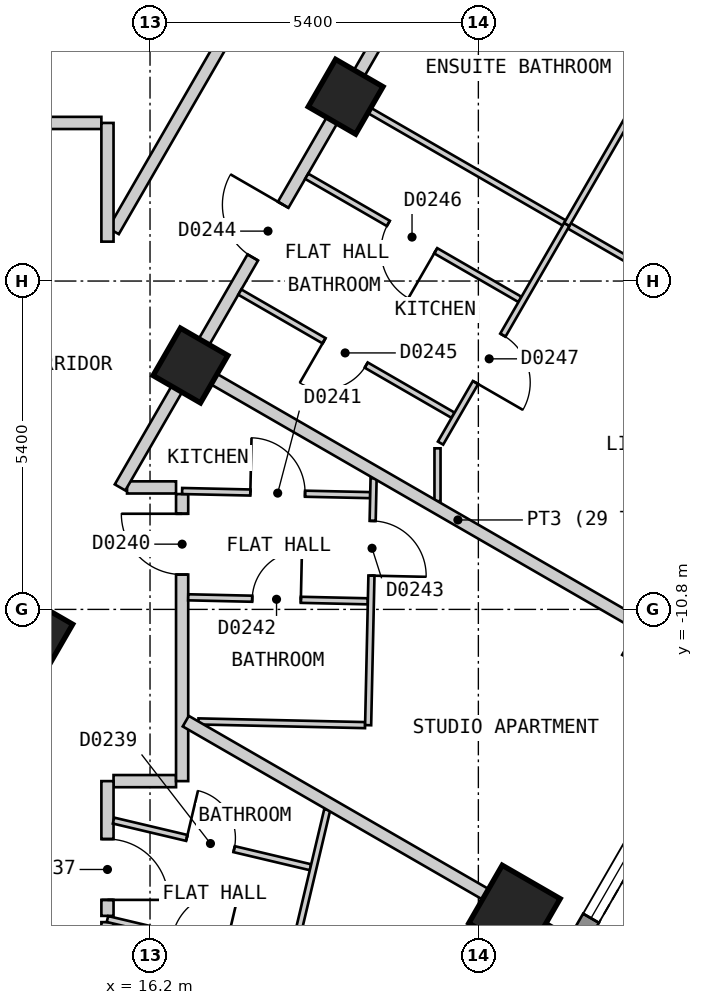
"""IFC4 building model, lengths in metres.
Left out: names, types, materials, properties, quantities, classifications, styles, units other than length and angle.
Written with IfcOpenShell. Run it as: python <this file> out.ifc"""

import sys

from ifc_helpers import new_model, si_unit, direction, frame, frame_2d, origin, origin_2d, place, context, subcontext, project, spatial, polyline, rectangle, outline, extrude, element, fill, save


model = new_model("IFC4")
c1 = context("Model", 3, precision=1e-05, world=origin(), true_north=direction((0.0, 1.0)))
c2 = subcontext(c1, "Body", "Model", "MODEL_VIEW")
j1 = project(units=[si_unit("LENGTHUNIT", "METRE"), si_unit("PLANEANGLEUNIT", "RADIAN")], contexts=[c1])
p1 = place(None, origin())
s1 = spatial("IfcSite", under=j1, at=p1, CompositionType="ELEMENT")
p2 = place(p1, origin())
s2 = spatial("IfcBuilding", under=s1, at=p2, CompositionType="ELEMENT")
p3 = place(p2, frame((0.0, 0.0, 41.4)))
s3 = spatial("IfcBuildingStorey", under=s2, at=p3, CompositionType="ELEMENT", Elevation=41.4)
p4 = place(p3, frame((22.194, -15.759, 0.0), z_axis=(0.0, 0.0, 1.0), x_axis=(0.499984884929, 0.866034130299, 0.0)))
e1 = element("IfcColumn", 1, at=p4, inside=s3, PredefinedType="COLUMN", context=c2, shape_type="SweptSolid", body=[
    extrude(rectangle(XDim=1.1, YDim=1.1, at=origin_2d()), origin(), (0.0, 0.0, 1.0), 3.0),
])
for number, where, z_axis, x_axis in (
    (2, (14.313, -11.209, 0.0), (0.0, 0.0, 1.0), (0.5, 0.866, 0.0)),
    (3, (16.865, -6.789, 0.0), (0.0, 0.0, 1.0), (0.5, 0.866, 0.0)),
    (4, (19.417, -2.369, 0.0), (0.0, 0.0, 1.0), (0.5, 0.866, 0.0)),
):
    element("IfcColumn", number, at=place(p3, frame(where, z_axis=z_axis, x_axis=x_axis)), inside=s3, PredefinedType="COLUMN", context=c2, shape_type="SweptSolid", body=[
        extrude(rectangle(XDim=0.9, YDim=0.9, at=origin_2d()), origin(), (0.0, 0.0, 1.0), 3.0),
    ])
p5 = place(p3, frame((17.71, -25.825, 0.0), z_axis=(0.0, 0.0, 1.0), x_axis=(0.500001938803, 0.866024284413, 0.0)))
e5 = element("IfcWall", 5, at=p5, inside=s3, PredefinedType="SOLIDWALL", context=c2, shape_type="SweptSolid", body=[
    extrude(outline(polyline([(0.0, -0.15), (27.02, -0.15), (26.94, 0.15), (0.08, 0.15), (0.0, -0.15)])), origin(), (0.0, 0.0, 1.0), 2.7),
])
p6 = place(p5, frame((1.277, 0.0, 0.15)))
e6 = element("IfcOpeningElement", 6, at=p6, cuts=e5, PredefinedType="OPENING", context=c2, shape_type="SweptSolid", body=[
    extrude(rectangle(XDim=1.5, YDim=2.1, at=frame_2d((0.75, 1.05))), frame((0.0, 0.16, 0.0), z_axis=(0.0, -1.0, 0.0), x_axis=(1.0, 0.0, 0.0)), (0.0, 0.0, 1.0), 0.32),
])
p7 = place(p5, frame((3.829, 0.0, 0.15)))
e7 = element("IfcOpeningElement", 7, at=p7, cuts=e5, PredefinedType="OPENING", context=c2, shape_type="SweptSolid", body=[
    extrude(rectangle(XDim=1.5, YDim=2.1, at=frame_2d((0.75, 1.05))), frame((0.0, 0.16, 0.0), z_axis=(0.0, -1.0, 0.0), x_axis=(1.0, 0.0, 0.0)), (0.0, 0.0, 1.0), 0.32),
])
p8 = place(p5, frame((6.382, 0.0, 0.15)))
e8 = element("IfcOpeningElement", 8, at=p8, cuts=e5, PredefinedType="OPENING", context=c2, shape_type="SweptSolid", body=[
    extrude(rectangle(XDim=1.5, YDim=2.1, at=frame_2d((0.75, 1.05))), frame((0.0, 0.16, 0.0), z_axis=(0.0, -1.0, 0.0), x_axis=(1.0, 0.0, 0.0)), (0.0, 0.0, 1.0), 0.32),
])
p9 = place(p5, frame((8.933, 0.0, 0.15)))
e9 = element("IfcOpeningElement", 9, at=p9, cuts=e5, PredefinedType="OPENING", context=c2, shape_type="SweptSolid", body=[
    extrude(rectangle(XDim=1.5, YDim=2.1, at=frame_2d((0.75, 1.05))), frame((0.0, 0.16, 0.0), z_axis=(0.0, -1.0, 0.0), x_axis=(1.0, 0.0, 0.0)), (0.0, 0.0, 1.0), 0.32),
])
p10 = place(p5, frame((11.485, 0.0, 0.15)))
e10 = element("IfcOpeningElement", 10, at=p10, cuts=e5, PredefinedType="OPENING", context=c2, shape_type="SweptSolid", body=[
    extrude(rectangle(XDim=1.5, YDim=2.1, at=frame_2d((0.75, 1.05))), frame((0.0, 0.16, 0.0), z_axis=(0.0, -1.0, 0.0), x_axis=(1.0, 0.0, 0.0)), (0.0, 0.0, 1.0), 0.32),
])
p11 = place(p5, frame((14.037, 0.0, 0.15)))
e11 = element("IfcOpeningElement", 11, at=p11, cuts=e5, PredefinedType="OPENING", context=c2, shape_type="SweptSolid", body=[
    extrude(rectangle(XDim=1.5, YDim=2.1, at=frame_2d((0.75, 1.05))), frame((0.0, 0.16, 0.0), z_axis=(0.0, -1.0, 0.0), x_axis=(1.0, 0.0, 0.0)), (0.0, 0.0, 1.0), 0.32),
])
p12 = place(p5, frame((16.589, 0.0, 0.15)))
e12 = element("IfcOpeningElement", 12, at=p12, cuts=e5, PredefinedType="OPENING", context=c2, shape_type="SweptSolid", body=[
    extrude(rectangle(XDim=1.5, YDim=2.1, at=frame_2d((0.75, 1.05))), frame((0.0, 0.16, 0.0), z_axis=(0.0, -1.0, 0.0), x_axis=(1.0, 0.0, 0.0)), (0.0, 0.0, 1.0), 0.32),
])
p13 = place(p5, frame((19.141, 0.0, 0.15)))
e13 = element("IfcOpeningElement", 13, at=p13, cuts=e5, PredefinedType="OPENING", context=c2, shape_type="SweptSolid", body=[
    extrude(rectangle(XDim=1.5, YDim=2.1, at=frame_2d((0.75, 1.05))), frame((0.0, 0.16, 0.0), z_axis=(0.0, -1.0, 0.0), x_axis=(1.0, 0.0, 0.0)), (0.0, 0.0, 1.0), 0.32),
])
p14 = place(p5, frame((21.693, 0.0, 0.15)))
e14 = element("IfcOpeningElement", 14, at=p14, cuts=e5, PredefinedType="OPENING", context=c2, shape_type="SweptSolid", body=[
    extrude(rectangle(XDim=1.5, YDim=2.1, at=frame_2d((0.75, 1.05))), frame((0.0, 0.16, 0.0), z_axis=(0.0, -1.0, 0.0), x_axis=(1.0, 0.0, 0.0)), (0.0, 0.0, 1.0), 0.32),
])
p15 = place(p5, frame((24.244, 0.0, 0.15)))
e15 = element("IfcOpeningElement", 15, at=p15, cuts=e5, PredefinedType="OPENING", context=c2, shape_type="SweptSolid", body=[
    extrude(rectangle(XDim=1.5, YDim=2.1, at=frame_2d((0.75, 1.05))), frame((0.0, 0.16, 0.0), z_axis=(0.0, -1.0, 0.0), x_axis=(1.0, 0.0, 0.0)), (0.0, 0.0, 1.0), 0.32),
])
p16 = place(p3, frame((15.5, -15.943, 0.0), z_axis=(0.0, 0.0, 1.0), x_axis=(0.0, -1.0, 0.0)))
e16 = element("IfcWall", 16, at=p16, inside=s3, PredefinedType="PARTITIONING", context=c2, shape_type="SweptSolid", body=[
    extrude(rectangle(XDim=1.729, YDim=0.2, at=frame_2d((0.865, 0.0))), origin(), (0.0, 0.0, 1.0), 2.7),
])
p17 = place(p3, frame((15.822, -8.794, 0.0), z_axis=(0.0, 0.0, 1.0), x_axis=(1.0, 0.0, 0.0)))
e17 = element("IfcWall", 17, at=p17, inside=s3, PredefinedType="PARTITIONING", context=c2, shape_type="SweptSolid", body=[
    extrude(rectangle(XDim=0.806, YDim=0.2, at=frame_2d((0.403, 0.0))), origin(), (0.0, 0.0, 1.0), 2.7),
])
p18 = place(p3, frame((15.6, -13.624, 0.0), z_axis=(0.0, 0.0, 1.0), x_axis=(1.0, 0.0, 0.0)))
e18 = element("IfcWall", 18, at=p18, inside=s3, PredefinedType="PARTITIONING", context=c2, shape_type="SweptSolid", body=[
    extrude(rectangle(XDim=1.028, YDim=0.2, at=frame_2d((0.514, 0.0))), origin(), (0.0, 0.0, 1.0), 2.7),
])
p19 = place(p3, frame((7.028, -2.8, 0.0), z_axis=(0.0, 0.0, 1.0), x_axis=(1.0, 0.0, 0.0)))
e19 = element("IfcWall", 19, at=p19, inside=s3, PredefinedType="PARTITIONING", context=c2, shape_type="SweptSolid", body=[
    extrude(rectangle(XDim=8.372, YDim=0.2, at=frame_2d((4.186, 0.0))), origin(), (0.0, 0.0, 1.0), 2.7),
])
p20 = place(p3, frame((15.6, -4.579, 0.0), z_axis=(0.0, 0.0, 1.0), x_axis=(0.499927597274, 0.866067201483, 0.0)))
e20 = element("IfcWall", 20, at=p20, inside=s3, PredefinedType="PARTITIONING", context=c2, shape_type="SweptSolid", body=[
    extrude(rectangle(XDim=5.288, YDim=0.2, at=frame_2d((2.644, 0.0))), origin(), (0.0, 0.0, 1.0), 2.7),
])
p21 = place(p3, frame((15.707, -8.794, 0.0), z_axis=(0.0, 0.0, 1.0), x_axis=(0.500040469623, 0.866002037376, 0.0)))
e21 = element("IfcWall", 21, at=p21, inside=s3, PredefinedType="PARTITIONING", context=c2, shape_type="SweptSolid", body=[
    extrude(rectangle(XDim=2.281, YDim=0.2, at=frame_2d((1.141, 0.0))), origin(), (0.0, 0.0, 1.0), 2.7),
])
p22 = place(p3, frame((16.864, -6.789, 0.0), z_axis=(0.0, 0.0, 1.0), x_axis=(0.500058020612, 0.865991902977, 0.0)))
e22 = element("IfcWall", 22, at=p22, inside=s3, PredefinedType="PARTITIONING", context=c2, shape_type="SweptSolid", body=[
    extrude(rectangle(XDim=7.725, YDim=0.2, at=frame_2d((3.863, 0.0))), origin(), (0.0, 0.0, 1.0), 2.7),
])
p23 = place(p22, frame((2.052, 0.0, 0.0)))
e23 = element("IfcOpeningElement", 23, at=p23, cuts=e22, PredefinedType="OPENING", context=c2, shape_type="SweptSolid", body=[
    extrude(rectangle(XDim=1.0, YDim=2.1, at=frame_2d((0.5, 1.05))), frame((0.0, 0.11, 0.0), z_axis=(0.0, -1.0, 0.0), x_axis=(1.0, 0.0, 0.0)), (0.0, 0.0, 1.0), 0.22),
])
p24 = place(p3, frame((15.5, -15.84, 0.0), z_axis=(0.0, 0.0, 1.0), x_axis=(0.0, 1.0, 0.0)))
e24 = element("IfcWall", 24, at=p24, inside=s3, PredefinedType="PARTITIONING", context=c2, shape_type="SweptSolid", body=[
    extrude(rectangle(XDim=2.216, YDim=0.2, at=frame_2d((1.108, 0.0))), origin(), (0.0, 0.0, 1.0), 2.7),
])
p25 = place(p24, frame((0.263, 0.0, 0.0)))
e25 = element("IfcOpeningElement", 25, at=p25, cuts=e24, PredefinedType="OPENING", context=c2, shape_type="SweptSolid", body=[
    extrude(rectangle(XDim=1.0, YDim=2.1, at=frame_2d((0.5, 1.05))), frame((0.0, 0.11, 0.0), z_axis=(0.0, -1.0, 0.0), x_axis=(1.0, 0.0, 0.0)), (0.0, 0.0, 1.0), 0.22),
])
p26 = place(p3, frame((15.5, -4.752, 0.0), z_axis=(0.0, 0.0, 1.0), x_axis=(0.0, 1.0, 0.0)))
e26 = element("IfcWall", 26, at=p26, inside=s3, PredefinedType="PARTITIONING", context=c2, shape_type="SweptSolid", body=[
    extrude(rectangle(XDim=1.952, YDim=0.2, at=frame_2d((0.976, 0.0))), origin(), (0.0, 0.0, 1.0), 2.7),
])
p27 = place(p3, frame((16.728, -13.624, 0.0), z_axis=(0.0, 0.0, 1.0), x_axis=(0.0, 1.0, 0.0)))
e27 = element("IfcWall", 27, at=p27, inside=s3, PredefinedType="PARTITIONING", context=c2, shape_type="SweptSolid", body=[
    extrude(rectangle(XDim=4.721, YDim=0.2, at=frame_2d((2.36, 0.0))), origin(), (0.0, 0.0, 1.0), 2.7),
])
p28 = place(p27, frame((3.397, 0.0, 0.0)))
e28 = element("IfcOpeningElement", 28, at=p28, cuts=e27, PredefinedType="OPENING", context=c2, shape_type="SweptSolid", body=[
    extrude(rectangle(XDim=1.0, YDim=2.1, at=frame_2d((0.5, 1.05))), frame((0.0, 0.11, 0.0), z_axis=(0.0, -1.0, 0.0), x_axis=(1.0, 0.0, 0.0)), (0.0, 0.0, 1.0), 0.22),
])
p29 = place(p3, frame((15.6, -14.273, 0.0), z_axis=(0.0, 0.0, 1.0), x_axis=(0.973083317443, -0.230453590368, 0.0)))
e29 = element("IfcWall", 29, at=p29, inside=s3, PredefinedType="PARTITIONING", context=c2, shape_type="SweptSolid", body=[
    extrude(rectangle(XDim=3.329, YDim=0.1, at=frame_2d((1.664, 0.0))), origin(), (0.0, 0.0, 1.0), 2.7),
])
p30 = place(p29, frame((1.238, 0.0, 0.0)))
e30 = element("IfcOpeningElement", 30, at=p30, cuts=e29, PredefinedType="OPENING", context=c2, shape_type="SweptSolid", body=[
    extrude(rectangle(XDim=0.8, YDim=2.1, at=frame_2d((0.4, 1.05))), frame((0.0, 0.06, 0.0), z_axis=(0.0, -1.0, 0.0), x_axis=(1.0, 0.0, 0.0)), (0.0, 0.0, 1.0), 0.12),
])
p31 = place(p3, frame((15.5, -15.892, 0.0), z_axis=(0.0, 0.0, 1.0), x_axis=(0.973119457068, -0.230300938504, 0.0)))
e31 = element("IfcWall", 31, at=p31, inside=s3, PredefinedType="PARTITIONING", context=c2, shape_type="SweptSolid", body=[
    extrude(rectangle(XDim=3.052, YDim=0.1, at=frame_2d((1.526, 0.0))), origin(), (0.0, 0.0, 1.0), 2.7),
])
p32 = place(p31, frame((1.102, 0.0, 0.0)))
e32 = element("IfcOpeningElement", 32, at=p32, cuts=e31, PredefinedType="OPENING", context=c2, shape_type="SweptSolid", body=[
    extrude(rectangle(XDim=0.9, YDim=2.1, at=frame_2d((0.45, 1.05))), frame((0.0, 0.06, 0.0), z_axis=(0.0, -1.0, 0.0), x_axis=(1.0, 0.0, 0.0)), (0.0, 0.0, 1.0), 0.12),
])
p33 = place(p3, frame((16.728, -8.853, 0.0), z_axis=(0.0, 0.0, 1.0), x_axis=(0.999759332126, -0.021938045176, 0.0)))
e33 = element("IfcWall", 33, at=p33, inside=s3, PredefinedType="PARTITIONING", context=c2, shape_type="SweptSolid", body=[
    extrude(rectangle(XDim=3.094, YDim=0.1, at=frame_2d((1.547, 0.0))), origin(), (0.0, 0.0, 1.0), 2.7),
])
p34 = place(p33, frame((1.122, 0.0, 0.0)))
e34 = element("IfcOpeningElement", 34, at=p34, cuts=e33, PredefinedType="OPENING", context=c2, shape_type="SweptSolid", body=[
    extrude(rectangle(XDim=0.9, YDim=2.1, at=frame_2d((0.45, 1.05))), frame((0.0, 0.06, 0.0), z_axis=(0.0, -1.0, 0.0), x_axis=(1.0, 0.0, 0.0)), (0.0, 0.0, 1.0), 0.12),
])
p35 = place(p3, frame((16.828, -10.601, 0.0), z_axis=(0.0, 0.0, 1.0), x_axis=(0.999751134527, -0.02230849639, 0.0)))
e35 = element("IfcWall", 35, at=p35, inside=s3, PredefinedType="PARTITIONING", context=c2, shape_type="SweptSolid", body=[
    extrude(rectangle(XDim=2.955, YDim=0.1, at=frame_2d((1.478, 0.0))), origin(), (0.0, 0.0, 1.0), 2.7),
])
p36 = place(p35, frame((1.053, 0.0, 0.0)))
e36 = element("IfcOpeningElement", 36, at=p36, cuts=e35, PredefinedType="OPENING", context=c2, shape_type="SweptSolid", body=[
    extrude(rectangle(XDim=0.8, YDim=2.1, at=frame_2d((0.4, 1.05))), frame((0.0, 0.06, 0.0), z_axis=(0.0, -1.0, 0.0), x_axis=(1.0, 0.0, 0.0)), (0.0, 0.0, 1.0), 0.12),
])
p37 = place(p3, frame((16.996, -12.642, 0.0), z_axis=(0.0, 0.0, 1.0), x_axis=(0.999754143854, -0.022173223641, 0.0)))
e37 = element("IfcWall", 37, at=p37, inside=s3, PredefinedType="PARTITIONING", context=c2, shape_type="SweptSolid", body=[
    extrude(rectangle(XDim=2.742, YDim=0.1, at=frame_2d((1.371, 0.0))), origin(), (0.0, 0.0, 1.0), 2.7),
])
p38 = place(p3, frame((17.677, -5.582, 0.0), z_axis=(0.0, 0.0, 1.0), x_axis=(0.866015917575, -0.500016430238, 0.0)))
e38 = element("IfcWall", 38, at=p38, inside=s3, PredefinedType="PARTITIONING", context=c2, shape_type="SweptSolid", body=[
    extrude(rectangle(XDim=4.05, YDim=0.1, at=frame_2d((2.025, 0.0))), origin(), (0.0, 0.0, 1.0), 2.7),
])
p39 = place(p38, frame((1.6, 0.0, 0.0)))
e39 = element("IfcOpeningElement", 39, at=p39, cuts=e38, PredefinedType="OPENING", context=c2, shape_type="SweptSolid", body=[
    extrude(rectangle(XDim=0.8, YDim=2.1, at=frame_2d((0.4, 1.05))), frame((0.0, 0.06, 0.0), z_axis=(0.0, -1.0, 0.0), x_axis=(1.0, 0.0, 0.0)), (0.0, 0.0, 1.0), 0.12),
])
p40 = place(p3, frame((18.777, -3.677, 0.0), z_axis=(0.0, 0.0, 1.0), x_axis=(0.866000843773, -0.500042536776, 0.0)))
e40 = element("IfcWall", 40, at=p40, inside=s3, PredefinedType="PARTITIONING", context=c2, shape_type="SweptSolid", body=[
    extrude(rectangle(XDim=4.05, YDim=0.1, at=frame_2d((2.025, 0.0))), origin(), (0.0, 0.0, 1.0), 2.7),
])
p41 = place(p40, frame((1.55, 0.0, 0.0)))
e41 = element("IfcOpeningElement", 41, at=p41, cuts=e40, PredefinedType="OPENING", context=c2, shape_type="SweptSolid", body=[
    extrude(rectangle(XDim=0.9, YDim=2.1, at=frame_2d((0.45, 1.05))), frame((0.0, 0.06, 0.0), z_axis=(0.0, -1.0, 0.0), x_axis=(1.0, 0.0, 0.0)), (0.0, 0.0, 1.0), 0.12),
])
p42 = place(p3, frame((19.503, -2.419, 0.0), z_axis=(0.0, 0.0, 1.0), x_axis=(0.866047370643, -0.499961950354, 0.0)))
e42 = element("IfcWall", 42, at=p42, inside=s3, PredefinedType="PARTITIONING", context=c2, shape_type="SweptSolid", body=[
    extrude(rectangle(XDim=10.001, YDim=0.1, at=frame_2d((5.0, 0.0))), origin(), (0.0, 0.0, 1.0), 2.7),
])
p43 = place(p42, frame((6.6, 0.0, 0.0)))
e43 = element("IfcOpeningElement", 43, at=p43, cuts=e42, PredefinedType="OPENING", context=c2, shape_type="SweptSolid", body=[
    extrude(rectangle(XDim=0.9, YDim=2.1, at=frame_2d((0.45, 1.05))), frame((0.0, 0.06, 0.0), z_axis=(0.0, -1.0, 0.0), x_axis=(1.0, 0.0, 0.0)), (0.0, 0.0, 1.0), 0.12),
])
p44 = place(p3, frame((20.978, -8.065, 0.0), z_axis=(0.0, 0.0, 1.0), x_axis=(0.499965068118, 0.866045570776, 0.0)))
e44 = element("IfcWall", 44, at=p44, inside=s3, PredefinedType="PARTITIONING", context=c2, shape_type="SweptSolid", body=[
    extrude(rectangle(XDim=4.152, YDim=0.1, at=frame_2d((2.076, 0.0))), origin(), (0.0, 0.0, 1.0), 2.7),
])
p45 = place(p44, frame((1.15, 0.0, 0.0)))
e45 = element("IfcOpeningElement", 45, at=p45, cuts=e44, PredefinedType="OPENING", context=c2, shape_type="SweptSolid", body=[
    extrude(rectangle(XDim=0.9, YDim=2.1, at=frame_2d((0.45, 1.05))), frame((0.0, 0.06, 0.0), z_axis=(0.0, -1.0, 0.0), x_axis=(1.0, 0.0, 0.0)), (0.0, 0.0, 1.0), 0.12),
])
p46 = place(p3, frame((18.52, -16.606, 0.0), z_axis=(0.0, 0.0, 1.0), x_axis=(0.230289488548, 0.973122166773, 0.0)))
e46 = element("IfcWall", 46, at=p46, inside=s3, PredefinedType="PARTITIONING", context=c2, shape_type="SweptSolid", body=[
    extrude(rectangle(XDim=2.579, YDim=0.1, at=frame_2d((1.29, 0.0))), origin(), (0.0, 0.0, 1.0), 2.7),
])
p47 = place(p3, frame((19.787, -12.704, 0.0), z_axis=(0.0, 0.0, 1.0), x_axis=(0.02212326712, 0.999755250575, 0.0)))
e47 = element("IfcWall", 47, at=p47, inside=s3, PredefinedType="PARTITIONING", context=c2, shape_type="SweptSolid", body=[
    extrude(rectangle(XDim=4.061, YDim=0.1, at=frame_2d((2.031, 0.0))), origin(), (0.0, 0.0, 1.0), 2.7),
])
p48 = place(p47, frame((2.46, 0.0, 0.0)))
e48 = element("IfcOpeningElement", 48, at=p48, cuts=e47, PredefinedType="OPENING", context=c2, shape_type="SweptSolid", body=[
    extrude(rectangle(XDim=0.9, YDim=2.1, at=frame_2d((0.45, 1.05))), frame((0.0, 0.06, 0.0), z_axis=(0.0, -1.0, 0.0), x_axis=(1.0, 0.0, 0.0)), (0.0, 0.0, 1.0), 0.12),
])
p49 = place(p3, frame((20.928, -9.02, 0.0), z_axis=(0.0, 0.0, 1.0), x_axis=(0.0, 1.0, 0.0)))
e49 = element("IfcWall", 49, at=p49, inside=s3, PredefinedType="PARTITIONING", context=c2, shape_type="SweptSolid", body=[
    extrude(rectangle(XDim=0.869, YDim=0.1, at=frame_2d((0.435, 0.0))), origin(), (0.0, 0.0, 1.0), 2.7),
])
p50 = place(p3, frame((16.788, -12.638, 0.0), z_axis=(0.0, 0.0, 1.0), x_axis=(0.866027278279, -0.499996753267, 0.0)))
e50 = element("IfcWall", 50, at=p50, inside=s3, PredefinedType="PARTITIONING", context=c2, shape_type="SweptSolid", body=[
    extrude(rectangle(XDim=7.242, YDim=0.2, at=frame_2d((3.621, 0.0))), origin(), (0.0, 0.0, 1.0), 2.7),
])
p51 = place(p3, frame((16.916, -6.819, 0.0), z_axis=(0.0, 0.0, 1.0), x_axis=(0.866028876723, -0.499993984646, 0.0)))
e51 = element("IfcWall", 51, at=p51, inside=s3, PredefinedType="PARTITIONING", context=c2, shape_type="SweptSolid", body=[
    extrude(rectangle(XDim=10.04, YDim=0.2, at=frame_2d((5.02, 0.0))), origin(), (0.0, 0.0, 1.0), 2.7),
])
p52 = place(p3, frame((23.054, -4.469, 0.0), z_axis=(0.0, 0.0, 1.0), x_axis=(0.500023345639, 0.866011924754, 0.0)))
e52 = element("IfcWall", 52, at=p52, inside=s3, PredefinedType="PARTITIONING", context=c2, shape_type="SweptSolid", body=[
    extrude(rectangle(XDim=5.104, YDim=0.1, at=frame_2d((2.552, 0.0))), origin(), (0.0, 0.0, 1.0), 2.7),
])
p53 = place(p52, frame((2.152, 0.0, 0.0)))
e53 = element("IfcOpeningElement", 53, at=p53, cuts=e52, PredefinedType="OPENING", context=c2, shape_type="SweptSolid", body=[
    extrude(rectangle(XDim=0.8, YDim=2.1, at=frame_2d((0.4, 1.05))), frame((0.0, 0.06, 0.0), z_axis=(0.0, -1.0, 0.0), x_axis=(1.0, 0.0, 0.0)), (0.0, 0.0, 1.0), 0.12),
])
p54 = place(p10, origin())
e54 = element("IfcWindow", 54, at=p54, inside=s3, PartitioningType="SINGLE_PANEL", PredefinedType="WINDOW", context=c2, shape_type="SweptSolid", body=[
    extrude(rectangle(XDim=1.5, YDim=2.1, at=frame_2d((0.75, 1.05))), frame((0.0, 0.03, 0.0), z_axis=(0.0, -1.0, 0.0), x_axis=(1.0, 0.0, 0.0)), (0.0, 0.0, 1.0), 0.06),
])
fill(e10, e54)
p55 = place(p25, origin())
e55 = element("IfcDoor", 55, at=p55, inside=s3, OperationType="SINGLE_SWING_LEFT", PredefinedType="DOOR", context=c2, shape_type="SweptSolid", body=[
    extrude(rectangle(XDim=1.0, YDim=2.1, at=frame_2d((0.5, 1.05))), frame((0.0, 0.025, 0.0), z_axis=(0.0, -1.0, 0.0), x_axis=(1.0, 0.0, 0.0)), (0.0, 0.0, 1.0), 0.05),
])
fill(e25, e55)
p56 = place(p30, origin())
e56 = element("IfcDoor", 56, at=p56, inside=s3, OperationType="SINGLE_SWING_LEFT", PredefinedType="DOOR", context=c2, shape_type="SweptSolid", body=[
    extrude(rectangle(XDim=0.8, YDim=2.1, at=frame_2d((0.4, 1.05))), frame((0.0, 0.025, 0.0), z_axis=(0.0, -1.0, 0.0), x_axis=(1.0, 0.0, 0.0)), (0.0, 0.0, 1.0), 0.05),
])
fill(e30, e56)
p57 = place(p28, origin())
e57 = element("IfcDoor", 57, at=p57, inside=s3, OperationType="SINGLE_SWING_RIGHT", PredefinedType="DOOR", context=c2, shape_type="SweptSolid", body=[
    extrude(rectangle(XDim=1.0, YDim=2.1, at=frame_2d((0.5, 1.05))), frame((0.0, 0.025, 0.0), z_axis=(0.0, -1.0, 0.0), x_axis=(1.0, 0.0, 0.0)), (0.0, 0.0, 1.0), 0.05),
])
fill(e28, e57)
p58 = place(p34, origin())
e58 = element("IfcDoor", 58, at=p58, inside=s3, OperationType="SINGLE_SWING_LEFT", PredefinedType="DOOR", context=c2, shape_type="SweptSolid", body=[
    extrude(rectangle(XDim=0.9, YDim=2.1, at=frame_2d((0.45, 1.05))), frame((0.0, 0.025, 0.0), z_axis=(0.0, -1.0, 0.0), x_axis=(1.0, 0.0, 0.0)), (0.0, 0.0, 1.0), 0.05),
])
fill(e34, e58)
p59 = place(p36, origin())
e59 = element("IfcDoor", 59, at=p59, inside=s3, OperationType="SINGLE_SWING_RIGHT", PredefinedType="DOOR", context=c2, shape_type="SweptSolid", body=[
    extrude(rectangle(XDim=0.8, YDim=2.1, at=frame_2d((0.4, 1.05))), frame((0.0, 0.025, 0.0), z_axis=(0.0, -1.0, 0.0), x_axis=(1.0, 0.0, 0.0)), (0.0, 0.0, 1.0), 0.05),
])
fill(e36, e59)
p60 = place(p48, origin())
e60 = element("IfcDoor", 60, at=p60, inside=s3, OperationType="SINGLE_SWING_LEFT", PredefinedType="DOOR", context=c2, shape_type="SweptSolid", body=[
    extrude(rectangle(XDim=0.9, YDim=2.1, at=frame_2d((0.45, 1.05))), frame((0.0, 0.025, 0.0), z_axis=(0.0, -1.0, 0.0), x_axis=(1.0, 0.0, 0.0)), (0.0, 0.0, 1.0), 0.05),
])
fill(e48, e60)
p61 = place(p23, origin())
e61 = element("IfcDoor", 61, at=p61, inside=s3, OperationType="SINGLE_SWING_RIGHT", PredefinedType="DOOR", context=c2, shape_type="SweptSolid", body=[
    extrude(rectangle(XDim=1.0, YDim=2.1, at=frame_2d((0.5, 1.05))), frame((0.0, 0.025, 0.0), z_axis=(0.0, -1.0, 0.0), x_axis=(1.0, 0.0, 0.0)), (0.0, 0.0, 1.0), 0.05),
])
fill(e23, e61)
p62 = place(p39, origin())
e62 = element("IfcDoor", 62, at=p62, inside=s3, OperationType="SINGLE_SWING_LEFT", PredefinedType="DOOR", context=c2, shape_type="SweptSolid", body=[
    extrude(rectangle(XDim=0.8, YDim=2.1, at=frame_2d((0.4, 1.05))), frame((0.0, 0.025, 0.0), z_axis=(0.0, -1.0, 0.0), x_axis=(1.0, 0.0, 0.0)), (0.0, 0.0, 1.0), 0.05),
])
fill(e39, e62)
p63 = place(p41, origin())
e63 = element("IfcDoor", 63, at=p63, inside=s3, OperationType="SINGLE_SWING_RIGHT", PredefinedType="DOOR", context=c2, shape_type="SweptSolid", body=[
    extrude(rectangle(XDim=0.9, YDim=2.1, at=frame_2d((0.45, 1.05))), frame((0.0, 0.025, 0.0), z_axis=(0.0, -1.0, 0.0), x_axis=(1.0, 0.0, 0.0)), (0.0, 0.0, 1.0), 0.05),
])
fill(e41, e63)
p64 = place(p45, origin())
e64 = element("IfcDoor", 64, at=p64, inside=s3, OperationType="SINGLE_SWING_LEFT", PredefinedType="DOOR", context=c2, shape_type="SweptSolid", body=[
    extrude(rectangle(XDim=0.9, YDim=2.1, at=frame_2d((0.45, 1.05))), frame((0.0, 0.025, 0.0), z_axis=(0.0, -1.0, 0.0), x_axis=(1.0, 0.0, 0.0)), (0.0, 0.0, 1.0), 0.05),
])
fill(e45, e64)
save(model, sys.argv[1])
